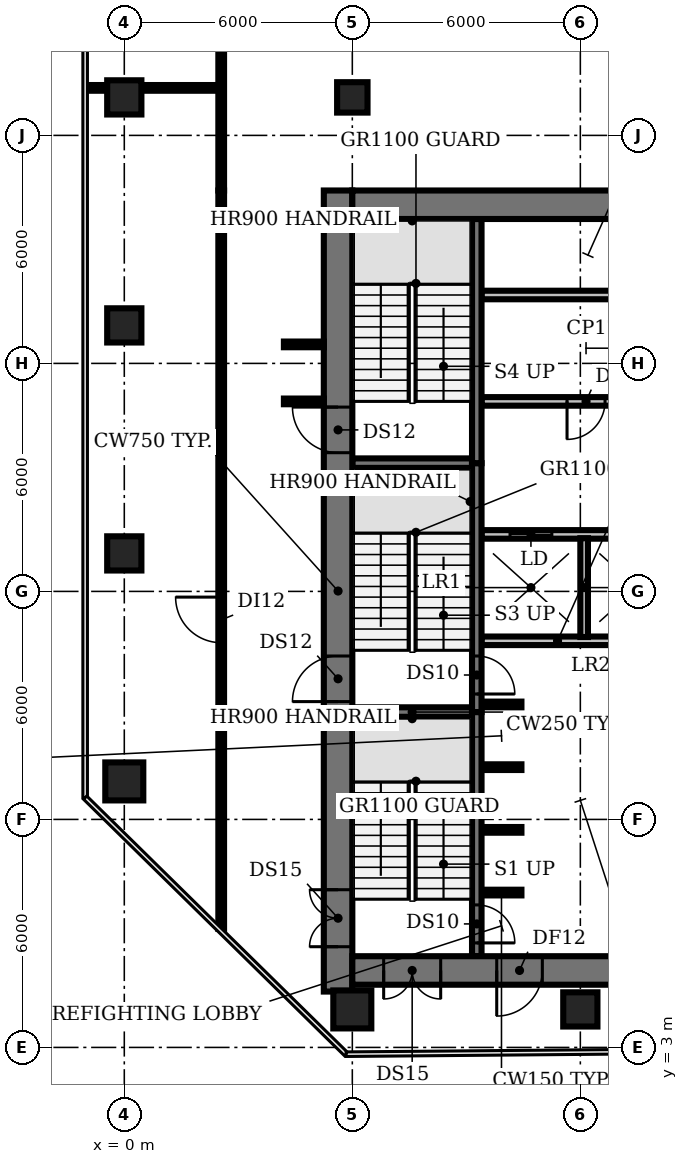
"""IFC4 building model, lengths in metres.
Left out: names, types, materials, properties, quantities, classifications, styles, units other than length and angle.
Written with IfcOpenShell. Run it as: python <this file> out.ifc"""

import sys

from ifc_helpers import new_model, si_unit, direction, frame, frame_2d, origin, origin_2d, place, context, subcontext, project, spatial, rectangle, circle, extrude, element, fill, save


model = new_model("IFC4")
c1 = context("Model", 3, precision=1e-05, world=origin(), true_north=direction((0.0, 1.0)))
c2 = subcontext(c1, "Body", "Model", "MODEL_VIEW")
j1 = project(units=[si_unit("LENGTHUNIT", "METRE"), si_unit("PLANEANGLEUNIT", "RADIAN")], contexts=[c1])
p1 = place(None, origin())
s1 = spatial("IfcSite", under=j1, at=p1, CompositionType="ELEMENT")
p2 = place(p1, origin())
s2 = spatial("IfcBuilding", under=s1, at=p2, CompositionType="ELEMENT")
p3 = place(p2, frame((0.0, 0.0, 108.8)))
s3 = spatial("IfcBuildingStorey", under=s2, at=p3, CompositionType="ELEMENT", Elevation=108.8)
p4 = place(p3, frame((0.0, 10.0, 0.0), z_axis=(0.0, 0.0, 1.0), x_axis=(1.0, 0.0, 0.0)))
e1 = element("IfcColumn", 1, at=p4, inside=s3, PredefinedType="COLUMN", context=c2, shape_type="SweptSolid", body=[
    extrude(circle(Radius=0.5, at=origin_2d()), origin(), (0.0, 0.0, 1.0), 3.85),
])
for number, where, z_axis, x_axis in (
    (2, (0.0, 16.0, 0.0), (0.0, 0.0, 1.0), (1.0, 0.0, 0.0)),
    (3, (0.0, 22.0, 0.0), (0.0, 0.0, 1.0), (1.0, 0.0, 0.0)),
    (4, (0.0, 28.0, 0.0), (0.0, 0.0, 1.0), (1.0, 0.0, 0.0)),
):
    element("IfcColumn", number, at=place(p3, frame(where, z_axis=z_axis, x_axis=x_axis)), inside=s3, PredefinedType="COLUMN", context=c2, shape_type="SweptSolid", body=[
        extrude(rectangle(XDim=0.9, YDim=0.9, at=origin_2d()), origin(), (0.0, 0.0, 1.0), 3.85),
    ])
p5 = place(p3, frame((6.0, 4.0, 0.0), z_axis=(0.0, 0.0, 1.0), x_axis=(1.0, 0.0, 0.0)))
e5 = element("IfcColumn", 5, at=p5, inside=s3, PredefinedType="COLUMN", context=c2, shape_type="SweptSolid", body=[
    extrude(circle(Radius=0.5, at=origin_2d()), origin(), (0.0, 0.0, 1.0), 3.85),
])
p6 = place(p3, frame((6.0, 28.0, 0.0), z_axis=(0.0, 0.0, 1.0), x_axis=(1.0, 0.0, 0.0)))
e6 = element("IfcColumn", 6, at=p6, inside=s3, PredefinedType="COLUMN", context=c2, shape_type="SweptSolid", body=[
    extrude(rectangle(XDim=0.8, YDim=0.8, at=origin_2d()), origin(), (0.0, 0.0, 1.0), 3.85),
])
p7 = place(p3, frame((12.0, 4.0, 0.0), z_axis=(0.0, 0.0, 1.0), x_axis=(1.0, 0.0, 0.0)))
e7 = element("IfcColumn", 7, at=p7, inside=s3, PredefinedType="COLUMN", context=c2, shape_type="SweptSolid", body=[
    extrude(rectangle(XDim=0.9, YDim=0.9, at=origin_2d()), origin(), (0.0, 0.0, 1.0), 3.85),
])
for number, where, z_axis, x_axis in (
    (8, (9.4, 7.075, 0.0), (0.0, 0.0, 1.0), (1.0, 0.0, 0.0)),
    (9, (9.4, 8.725, 0.0), (0.0, 0.0, 1.0), (1.0, 0.0, 0.0)),
    (10, (9.4, 10.375, 0.0), (0.0, 0.0, 1.0), (1.0, 0.0, 0.0)),
):
    element("IfcWall", number, at=place(p3, frame(where, z_axis=z_axis, x_axis=x_axis)), inside=s3, PredefinedType="SHEAR", context=c2, shape_type="SweptSolid", body=[
        extrude(rectangle(XDim=1.05, YDim=0.15, at=frame_2d((0.525, 0.0))), origin(), (0.0, 0.0, 1.0), 3.85),
    ])
p8 = place(p3, frame((6.0, 11.825, 0.0), z_axis=(0.0, 0.0, 1.0), x_axis=(1.0, 0.0, 0.0)))
e11 = element("IfcWall", 11, at=p8, inside=s3, PredefinedType="SHEAR", context=c2, shape_type="SweptSolid", body=[
    extrude(rectangle(XDim=3.15, YDim=0.25, at=frame_2d((1.575, 0.0))), origin(), (0.0, 0.0, 1.0), 3.85),
])
p9 = place(p3, frame((9.4, 12.025, 0.0), z_axis=(0.0, 0.0, 1.0), x_axis=(1.0, 0.0, 0.0)))
e12 = element("IfcWall", 12, at=p9, inside=s3, PredefinedType="SHEAR", context=c2, shape_type="SweptSolid", body=[
    extrude(rectangle(XDim=1.05, YDim=0.15, at=frame_2d((0.525, 0.0))), origin(), (0.0, 0.0, 1.0), 3.85),
])
p10 = place(p3, frame((9.4, 13.7, 0.0), z_axis=(0.0, 0.0, 1.0), x_axis=(1.0, 0.0, 0.0)))
e13 = element("IfcWall", 13, at=p10, inside=s3, PredefinedType="PARTITIONING", context=c2, shape_type="SweptSolid", body=[
    extrude(rectangle(XDim=4.0, YDim=0.225, at=frame_2d((2.0, 0.0))), origin(), (0.0, 0.0, 1.0), 3.85),
])
p11 = place(p3, frame((9.4, 16.5, 0.0), z_axis=(0.0, 0.0, 1.0), x_axis=(1.0, 0.0, 0.0)))
e14 = element("IfcWall", 14, at=p11, inside=s3, PredefinedType="PARTITIONING", context=c2, shape_type="SweptSolid", body=[
    extrude(rectangle(XDim=14.6, YDim=0.225, at=frame_2d((7.3, 0.0))), origin(), (0.0, 0.0, 1.0), 3.85),
])
p12 = place(p11, frame((0.75, 0.0, 0.0)))
e15 = element("IfcOpeningElement", 15, at=p12, cuts=e14, PredefinedType="OPENING", context=c2, shape_type="SweptSolid", body=[
    extrude(rectangle(XDim=1.1, YDim=2.1, at=frame_2d((0.55, 1.05))), frame((0.0, 0.123, 0.0), z_axis=(0.0, -1.0, 0.0), x_axis=(1.0, 0.0, 0.0)), (0.0, 0.0, 1.0), 0.245),
])
p13 = place(p11, frame((3.55, 0.0, 0.0)))
e16 = element("IfcOpeningElement", 16, at=p13, cuts=e14, PredefinedType="OPENING", context=c2, shape_type="SweptSolid", body=[
    extrude(rectangle(XDim=1.1, YDim=2.1, at=frame_2d((0.55, 1.05))), frame((0.0, 0.123, 0.0), z_axis=(0.0, -1.0, 0.0), x_axis=(1.0, 0.0, 0.0)), (0.0, 0.0, 1.0), 0.245),
])
p14 = place(p11, frame((6.35, 0.0, 0.0)))
e17 = element("IfcOpeningElement", 17, at=p14, cuts=e14, PredefinedType="OPENING", context=c2, shape_type="SweptSolid", body=[
    extrude(rectangle(XDim=1.1, YDim=2.1, at=frame_2d((0.55, 1.05))), frame((0.0, 0.123, 0.0), z_axis=(0.0, -1.0, 0.0), x_axis=(1.0, 0.0, 0.0)), (0.0, 0.0, 1.0), 0.245),
])
p15 = place(p11, frame((9.15, 0.0, 0.0)))
e18 = element("IfcOpeningElement", 18, at=p15, cuts=e14, PredefinedType="OPENING", context=c2, shape_type="SweptSolid", body=[
    extrude(rectangle(XDim=1.1, YDim=2.1, at=frame_2d((0.55, 1.05))), frame((0.0, 0.123, 0.0), z_axis=(0.0, -1.0, 0.0), x_axis=(1.0, 0.0, 0.0)), (0.0, 0.0, 1.0), 0.245),
])
p16 = place(p11, frame((11.308, 0.0, 0.0)))
e19 = element("IfcOpeningElement", 19, at=p16, cuts=e14, PredefinedType="OPENING", context=c2, shape_type="SweptSolid", body=[
    extrude(rectangle(XDim=0.9, YDim=2.1, at=frame_2d((0.45, 1.05))), frame((0.0, 0.123, 0.0), z_axis=(0.0, -1.0, 0.0), x_axis=(1.0, 0.0, 0.0)), (0.0, 0.0, 1.0), 0.245),
])
p17 = place(p11, frame((13.083, 0.0, 0.0)))
e20 = element("IfcOpeningElement", 20, at=p17, cuts=e14, PredefinedType="OPENING", context=c2, shape_type="SweptSolid", body=[
    extrude(rectangle(XDim=0.9, YDim=2.1, at=frame_2d((0.45, 1.05))), frame((0.0, 0.123, 0.0), z_axis=(0.0, -1.0, 0.0), x_axis=(1.0, 0.0, 0.0)), (0.0, 0.0, 1.0), 0.245),
])
p18 = place(p3, frame((6.0, 18.375, 0.0), z_axis=(0.0, 0.0, 1.0), x_axis=(1.0, 0.0, 0.0)))
e21 = element("IfcWall", 21, at=p18, inside=s3, PredefinedType="SHEAR", context=c2, shape_type="SweptSolid", body=[
    extrude(rectangle(XDim=3.15, YDim=0.25, at=frame_2d((1.575, 0.0))), origin(), (0.0, 0.0, 1.0), 3.85),
])
p19 = place(p3, frame((24.0, 20.0, 0.0), z_axis=(0.0, 0.0, 1.0), x_axis=(-1.0, 0.0, 0.0)))
e22 = element("IfcWall", 22, at=p19, inside=s3, PredefinedType="PARTITIONING", context=c2, shape_type="SweptSolid", body=[
    extrude(rectangle(XDim=14.6, YDim=0.225, at=frame_2d((7.3, 0.0))), origin(), (0.0, 0.0, 1.0), 3.85),
])
p20 = place(p19, frame((11.35, 0.0, 0.0)))
e23 = element("IfcOpeningElement", 23, at=p20, cuts=e22, PredefinedType="OPENING", context=c2, shape_type="SweptSolid", body=[
    extrude(rectangle(XDim=1.0, YDim=2.1, at=frame_2d((0.5, 1.05))), frame((0.0, 0.123, 0.0), z_axis=(0.0, -1.0, 0.0), x_axis=(1.0, 0.0, 0.0)), (0.0, 0.0, 1.0), 0.245),
])
p21 = place(p19, frame((5.775, 0.0, 0.0)))
e24 = element("IfcOpeningElement", 24, at=p21, cuts=e22, PredefinedType="OPENING", context=c2, shape_type="SweptSolid", body=[
    extrude(rectangle(XDim=1.0, YDim=2.1, at=frame_2d((0.5, 1.05))), frame((0.0, 0.123, 0.0), z_axis=(0.0, -1.0, 0.0), x_axis=(1.0, 0.0, 0.0)), (0.0, 0.0, 1.0), 0.245),
])
p22 = place(p19, frame((2.308, 0.0, 0.0)))
e25 = element("IfcOpeningElement", 25, at=p22, cuts=e22, PredefinedType="OPENING", context=c2, shape_type="SweptSolid", body=[
    extrude(rectangle(XDim=0.9, YDim=2.1, at=frame_2d((0.45, 1.05))), frame((0.0, 0.123, 0.0), z_axis=(0.0, -1.0, 0.0), x_axis=(1.0, 0.0, 0.0)), (0.0, 0.0, 1.0), 0.245),
])
p23 = place(p19, frame((0.532, 0.0, 0.0)))
e26 = element("IfcOpeningElement", 26, at=p23, cuts=e22, PredefinedType="OPENING", context=c2, shape_type="SweptSolid", body=[
    extrude(rectangle(XDim=0.9, YDim=2.1, at=frame_2d((0.45, 1.05))), frame((0.0, 0.123, 0.0), z_axis=(0.0, -1.0, 0.0), x_axis=(1.0, 0.0, 0.0)), (0.0, 0.0, 1.0), 0.245),
])
p24 = place(p3, frame((9.4, 22.8, 0.0), z_axis=(0.0, 0.0, 1.0), x_axis=(1.0, 0.0, 0.0)))
e27 = element("IfcWall", 27, at=p24, inside=s3, PredefinedType="PARTITIONING", context=c2, shape_type="SweptSolid", body=[
    extrude(rectangle(XDim=14.6, YDim=0.225, at=frame_2d((7.3, 0.0))), origin(), (0.0, 0.0, 1.0), 3.85),
])
p25 = place(p3, frame((9.275, 11.825, 0.0), z_axis=(0.0, 0.0, 1.0), x_axis=(0.0, -1.0, 0.0)))
e28 = element("IfcWall", 28, at=p25, inside=s3, PredefinedType="SHEAR", context=c2, shape_type="SweptSolid", body=[
    extrude(rectangle(XDim=6.425, YDim=0.25, at=frame_2d((3.212, 0.0))), origin(), (0.0, 0.0, 1.0), 3.85),
])
p26 = place(p25, frame((5.075, 0.0, 0.0)))
e29 = element("IfcOpeningElement", 29, at=p26, cuts=e28, PredefinedType="OPENING", context=c2, shape_type="SweptSolid", body=[
    extrude(rectangle(XDim=1.0, YDim=2.1, at=frame_2d((0.5, 1.05))), frame((0.0, 0.135, 0.0), z_axis=(0.0, -1.0, 0.0), x_axis=(1.0, 0.0, 0.0)), (0.0, 0.0, 1.0), 0.27),
])
p27 = place(p3, frame((9.275, 18.375, 0.0), z_axis=(0.0, 0.0, 1.0), x_axis=(0.0, -1.0, 0.0)))
e30 = element("IfcWall", 30, at=p27, inside=s3, PredefinedType="SHEAR", context=c2, shape_type="SweptSolid", body=[
    extrude(rectangle(XDim=6.55, YDim=0.25, at=frame_2d((3.275, 0.0))), origin(), (0.0, 0.0, 1.0), 3.85),
])
p28 = place(p27, frame((5.075, 0.0, 0.0)))
e31 = element("IfcOpeningElement", 31, at=p28, cuts=e30, PredefinedType="OPENING", context=c2, shape_type="SweptSolid", body=[
    extrude(rectangle(XDim=1.0, YDim=2.1, at=frame_2d((0.5, 1.05))), frame((0.0, 0.135, 0.0), z_axis=(0.0, -1.0, 0.0), x_axis=(1.0, 0.0, 0.0)), (0.0, 0.0, 1.0), 0.27),
])
p29 = place(p3, frame((9.275, 18.375, 0.0), z_axis=(0.0, 0.0, 1.0), x_axis=(0.0, 1.0, 0.0)))
e32 = element("IfcWall", 32, at=p29, inside=s3, PredefinedType="SHEAR", context=c2, shape_type="SweptSolid", body=[
    extrude(rectangle(XDim=6.425, YDim=0.25, at=frame_2d((3.212, 0.0))), origin(), (0.0, 0.0, 1.0), 3.85),
])
p30 = place(p3, frame((12.1, 13.8, 0.0), z_axis=(0.0, 0.0, 1.0), x_axis=(0.0, 1.0, 0.0)))
e33 = element("IfcWall", 33, at=p30, inside=s3, PredefinedType="SOLIDWALL", context=c2, shape_type="SweptSolid", body=[
    extrude(rectangle(XDim=2.6, YDim=0.2, at=frame_2d((1.3, 0.0))), origin(), (0.0, 0.0, 1.0), 3.85),
])
p31 = place(p3, frame((5.625, 4.47, 0.0), z_axis=(0.0, 0.0, 1.0), x_axis=(0.0, 1.0, 0.0)))
e34 = element("IfcWall", 34, at=p31, inside=s3, PredefinedType="SHEAR", context=c2, shape_type="SweptSolid", body=[
    extrude(rectangle(XDim=21.08, YDim=0.75, at=frame_2d((10.54, 0.0))), origin(), (0.0, 0.0, 1.0), 3.85),
])
p32 = place(p31, frame((1.18, 0.0, 0.0)))
e35 = element("IfcOpeningElement", 35, at=p32, cuts=e34, PredefinedType="OPENING", context=c2, shape_type="SweptSolid", body=[
    extrude(rectangle(XDim=1.5, YDim=2.1, at=frame_2d((0.75, 1.05))), frame((0.0, 0.385, 0.0), z_axis=(0.0, -1.0, 0.0), x_axis=(1.0, 0.0, 0.0)), (0.0, 0.0, 1.0), 0.77),
])
p33 = place(p31, frame((7.63, 0.0, 0.0)))
e36 = element("IfcOpeningElement", 36, at=p33, cuts=e34, PredefinedType="OPENING", context=c2, shape_type="SweptSolid", body=[
    extrude(rectangle(XDim=1.2, YDim=2.1, at=frame_2d((0.6, 1.05))), frame((0.0, 0.385, 0.0), z_axis=(0.0, -1.0, 0.0), x_axis=(1.0, 0.0, 0.0)), (0.0, 0.0, 1.0), 0.77),
])
p34 = place(p31, frame((14.18, 0.0, 0.0)))
e37 = element("IfcOpeningElement", 37, at=p34, cuts=e34, PredefinedType="OPENING", context=c2, shape_type="SweptSolid", body=[
    extrude(rectangle(XDim=1.2, YDim=2.1, at=frame_2d((0.6, 1.05))), frame((0.0, 0.385, 0.0), z_axis=(0.0, -1.0, 0.0), x_axis=(1.0, 0.0, 0.0)), (0.0, 0.0, 1.0), 0.77),
])
p35 = place(p3, frame((24.0, 5.025, 0.0), z_axis=(0.0, 0.0, 1.0), x_axis=(-1.0, 0.0, 0.0)))
e38 = element("IfcWall", 38, at=p35, inside=s3, PredefinedType="SHEAR", context=c2, shape_type="SweptSolid", body=[
    extrude(rectangle(XDim=18.0, YDim=0.75, at=frame_2d((9.0, 0.0))), origin(), (0.0, 0.0, 1.0), 3.85),
])
p36 = place(p35, frame((0.825, 0.0, 0.0)))
e39 = element("IfcOpeningElement", 39, at=p36, cuts=e38, PredefinedType="OPENING", context=c2, shape_type="SweptSolid", body=[
    extrude(rectangle(XDim=1.5, YDim=2.1, at=frame_2d((0.75, 1.05))), frame((0.0, 0.385, 0.0), z_axis=(0.0, -1.0, 0.0), x_axis=(1.0, 0.0, 0.0)), (0.0, 0.0, 1.0), 0.77),
])
p37 = place(p35, frame((15.675, 0.0, 0.0)))
e40 = element("IfcOpeningElement", 40, at=p37, cuts=e38, PredefinedType="OPENING", context=c2, shape_type="SweptSolid", body=[
    extrude(rectangle(XDim=1.5, YDim=2.1, at=frame_2d((0.75, 1.05))), frame((0.0, 0.385, 0.0), z_axis=(0.0, -1.0, 0.0), x_axis=(1.0, 0.0, 0.0)), (0.0, 0.0, 1.0), 0.77),
])
p38 = place(p35, frame((13.0, 0.0, 0.0)))
e41 = element("IfcOpeningElement", 41, at=p38, cuts=e38, PredefinedType="OPENING", context=c2, shape_type="SweptSolid", body=[
    extrude(rectangle(XDim=1.2, YDim=2.1, at=frame_2d((0.6, 1.05))), frame((0.0, 0.385, 0.0), z_axis=(0.0, -1.0, 0.0), x_axis=(1.0, 0.0, 0.0)), (0.0, 0.0, 1.0), 0.77),
])
p39 = place(p35, frame((4.35, 0.0, 0.0)))
e42 = element("IfcOpeningElement", 42, at=p39, cuts=e38, PredefinedType="OPENING", context=c2, shape_type="SweptSolid", body=[
    extrude(rectangle(XDim=1.0, YDim=2.1, at=frame_2d((0.5, 1.05))), frame((0.0, 0.385, 0.0), z_axis=(0.0, -1.0, 0.0), x_axis=(1.0, 0.0, 0.0)), (0.0, 0.0, 1.0), 0.77),
])
p40 = place(p3, frame((6.0, 25.175, 0.0), z_axis=(0.0, 0.0, 1.0), x_axis=(1.0, 0.0, 0.0)))
e43 = element("IfcWall", 43, at=p40, inside=s3, PredefinedType="SHEAR", context=c2, shape_type="SweptSolid", body=[
    extrude(rectangle(XDim=18.0, YDim=0.75, at=frame_2d((9.0, 0.0))), origin(), (0.0, 0.0, 1.0), 3.85),
])
p41 = place(p3, frame((-0.98, 28.25, 0.0), z_axis=(0.0, 0.0, 1.0), x_axis=(1.0, 0.0, 0.0)))
e44 = element("IfcWall", 44, at=p41, inside=s3, PredefinedType="PARTITIONING", context=c2, shape_type="SweptSolid", body=[
    extrude(rectangle(XDim=3.53, YDim=0.15, at=frame_2d((1.765, 0.0))), origin(), (0.0, 0.0, 1.0), 2.83),
])
p42 = place(p3, frame((2.55, 6.12, 0.0), z_axis=(0.0, 0.0, 1.0), x_axis=(0.0, 1.0, 0.0)))
e45 = element("IfcWall", 45, at=p42, inside=s3, PredefinedType="PARTITIONING", context=c2, shape_type="SweptSolid", body=[
    extrude(rectangle(XDim=19.43, YDim=0.15, at=frame_2d((9.715, 0.0))), origin(), (0.0, 0.0, 1.0), 2.83),
])
p43 = place(p42, frame((7.53, 0.0, 0.0)))
e46 = element("IfcOpeningElement", 46, at=p43, cuts=e45, PredefinedType="OPENING", context=c2, shape_type="SweptSolid", body=[
    extrude(rectangle(XDim=1.2, YDim=2.1, at=frame_2d((0.6, 1.05))), frame((0.0, 0.085, 0.0), z_axis=(0.0, -1.0, 0.0), x_axis=(1.0, 0.0, 0.0)), (0.0, 0.0, 1.0), 0.17),
])
p44 = place(p3, frame((2.55, 25.55, 0.0), z_axis=(0.0, 0.0, 1.0), x_axis=(0.0, 1.0, 0.0)))
e47 = element("IfcWall", 47, at=p44, inside=s3, PredefinedType="PARTITIONING", context=c2, shape_type="SweptSolid", body=[
    extrude(rectangle(XDim=3.9, YDim=0.15, at=frame_2d((1.95, 0.0))), origin(), (0.0, 0.0, 1.0), 2.83),
])
for number, where, z_axis, x_axis in (
    (48, (4.2, 20.0, 0.0), (0.0, 0.0, 1.0), (1.0, 0.0, 0.0)),
    (49, (4.2, 21.5, 0.0), (0.0, 0.0, 1.0), (1.0, 0.0, 0.0)),
):
    element("IfcWall", number, at=place(p3, frame(where, z_axis=z_axis, x_axis=x_axis)), inside=s3, PredefinedType="PARTITIONING", context=c2, shape_type="SweptSolid", body=[
        extrude(rectangle(XDim=1.05, YDim=0.15, at=frame_2d((0.525, 0.0))), origin(), (0.0, 0.0, 1.0), 2.83),
    ])
p45 = place(p12, origin())
e50 = element("IfcDoor", 50, at=p45, inside=s3, OperationType="DOUBLE_DOOR_SLIDING", PredefinedType="DOOR", context=c2, shape_type="SweptSolid", body=[
    extrude(rectangle(XDim=1.1, YDim=2.1, at=frame_2d((0.55, 1.05))), frame((0.0, 0.025, 0.0), z_axis=(0.0, -1.0, 0.0), x_axis=(1.0, 0.0, 0.0)), (0.0, 0.0, 1.0), 0.05),
])
fill(e15, e50)
p46 = place(p20, origin())
e51 = element("IfcDoor", 51, at=p46, inside=s3, OperationType="SINGLE_SWING_RIGHT", PredefinedType="DOOR", context=c2, shape_type="SweptSolid", body=[
    extrude(rectangle(XDim=1.0, YDim=2.1, at=frame_2d((0.5, 1.05))), frame((0.0, 0.025, 0.0), z_axis=(0.0, -1.0, 0.0), x_axis=(1.0, 0.0, 0.0)), (0.0, 0.0, 1.0), 0.05),
])
fill(e23, e51)
p47 = place(p26, origin())
e52 = element("IfcDoor", 52, at=p47, inside=s3, OperationType="SINGLE_SWING_RIGHT", PredefinedType="DOOR", context=c2, shape_type="SweptSolid", body=[
    extrude(rectangle(XDim=1.0, YDim=2.1, at=frame_2d((0.5, 1.05))), frame((0.0, 0.025, 0.0), z_axis=(0.0, -1.0, 0.0), x_axis=(1.0, 0.0, 0.0)), (0.0, 0.0, 1.0), 0.05),
])
fill(e29, e52)
p48 = place(p28, origin())
e53 = element("IfcDoor", 53, at=p48, inside=s3, OperationType="SINGLE_SWING_RIGHT", PredefinedType="DOOR", context=c2, shape_type="SweptSolid", body=[
    extrude(rectangle(XDim=1.0, YDim=2.1, at=frame_2d((0.5, 1.05))), frame((0.0, 0.025, 0.0), z_axis=(0.0, -1.0, 0.0), x_axis=(1.0, 0.0, 0.0)), (0.0, 0.0, 1.0), 0.05),
])
fill(e31, e53)
p49 = place(p32, origin())
e54 = element("IfcDoor", 54, at=p49, inside=s3, OperationType="DOUBLE_DOOR_SINGLE_SWING", PredefinedType="DOOR", context=c2, shape_type="SweptSolid", body=[
    extrude(rectangle(XDim=1.5, YDim=2.1, at=frame_2d((0.75, 1.05))), frame((0.0, 0.025, 0.0), z_axis=(0.0, -1.0, 0.0), x_axis=(1.0, 0.0, 0.0)), (0.0, 0.0, 1.0), 0.05),
])
fill(e35, e54)
p50 = place(p33, origin())
e55 = element("IfcDoor", 55, at=p50, inside=s3, OperationType="SINGLE_SWING_LEFT", PredefinedType="DOOR", context=c2, shape_type="SweptSolid", body=[
    extrude(rectangle(XDim=1.2, YDim=2.1, at=frame_2d((0.6, 1.05))), frame((0.0, 0.025, 0.0), z_axis=(0.0, -1.0, 0.0), x_axis=(1.0, 0.0, 0.0)), (0.0, 0.0, 1.0), 0.05),
])
fill(e36, e55)
p51 = place(p34, origin())
e56 = element("IfcDoor", 56, at=p51, inside=s3, OperationType="SINGLE_SWING_RIGHT", PredefinedType="DOOR", context=c2, shape_type="SweptSolid", body=[
    extrude(rectangle(XDim=1.2, YDim=2.1, at=frame_2d((0.6, 1.05))), frame((0.0, 0.025, 0.0), z_axis=(0.0, -1.0, 0.0), x_axis=(1.0, 0.0, 0.0)), (0.0, 0.0, 1.0), 0.05),
])
fill(e37, e56)
p52 = place(p37, origin())
e57 = element("IfcDoor", 57, at=p52, inside=s3, OperationType="DOUBLE_DOOR_SINGLE_SWING", PredefinedType="DOOR", context=c2, shape_type="SweptSolid", body=[
    extrude(rectangle(XDim=1.5, YDim=2.1, at=frame_2d((0.75, 1.05))), frame((0.0, 0.025, 0.0), z_axis=(0.0, -1.0, 0.0), x_axis=(1.0, 0.0, 0.0)), (0.0, 0.0, 1.0), 0.05),
])
fill(e40, e57)
p53 = place(p38, origin())
e58 = element("IfcDoor", 58, at=p53, inside=s3, OperationType="SINGLE_SWING_RIGHT", PredefinedType="DOOR", context=c2, shape_type="SweptSolid", body=[
    extrude(rectangle(XDim=1.2, YDim=2.1, at=frame_2d((0.6, 1.05))), frame((0.0, 0.025, 0.0), z_axis=(0.0, -1.0, 0.0), x_axis=(1.0, 0.0, 0.0)), (0.0, 0.0, 1.0), 0.05),
])
fill(e41, e58)
p54 = place(p43, origin())
e59 = element("IfcDoor", 59, at=p54, inside=s3, OperationType="SINGLE_SWING_RIGHT", PredefinedType="DOOR", context=c2, shape_type="SweptSolid", body=[
    extrude(rectangle(XDim=1.2, YDim=2.1, at=frame_2d((0.6, 1.05))), frame((0.0, 0.025, 0.0), z_axis=(0.0, -1.0, 0.0), x_axis=(1.0, 0.0, 0.0)), (0.0, 0.0, 1.0), 0.05),
])
fill(e46, e59)
save(model, sys.argv[1])
